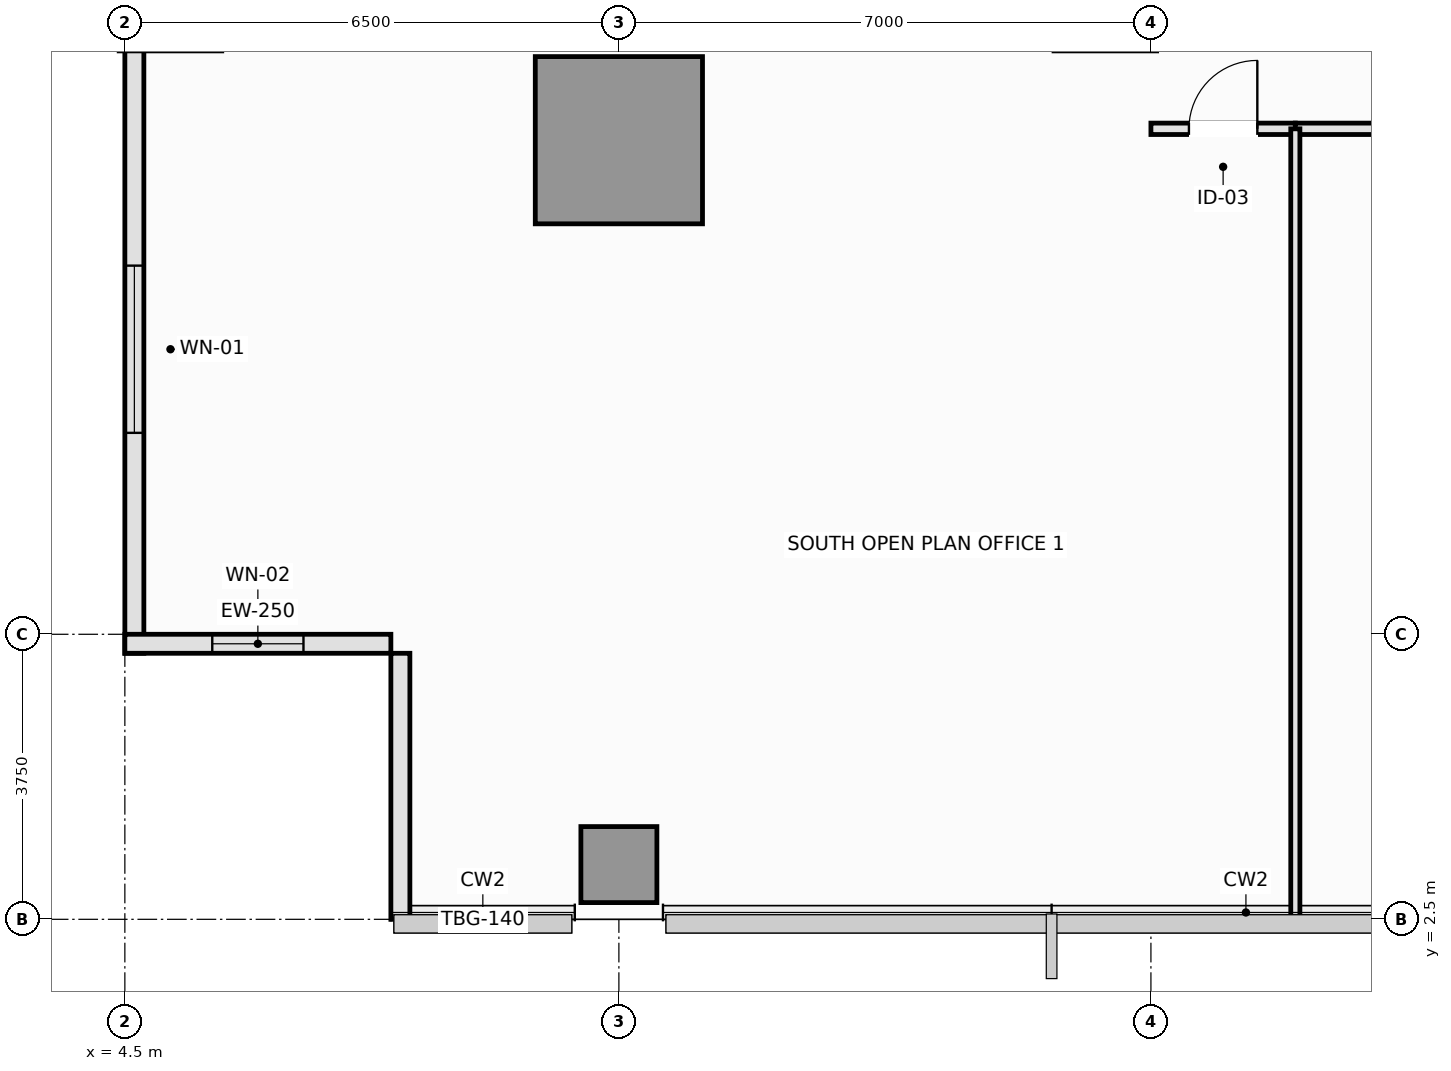
"""IFC4 building model, lengths in metres.
Left out: names, types, materials, properties, quantities, classifications, styles, units other than length and angle.
Written with IfcOpenShell. Run it as: python <this file> out.ifc"""

import sys

from ifc_helpers import new_model, si_unit, direction, frame, frame_2d, origin, origin_2d, place, context, subcontext, project, spatial, rectangle, extrude, element, fill, save


model = new_model("IFC4")
c1 = context("Model", 3, precision=1e-05, world=origin(), true_north=direction((0.0, 1.0)))
c2 = subcontext(c1, "Body", "Model", "MODEL_VIEW")
j1 = project(units=[si_unit("LENGTHUNIT", "METRE"), si_unit("PLANEANGLEUNIT", "RADIAN")], contexts=[c1])
p1 = place(None, origin())
s1 = spatial("IfcSite", under=j1, at=p1, CompositionType="ELEMENT")
p2 = place(p1, origin())
s2 = spatial("IfcBuilding", under=s1, at=p2, CompositionType="ELEMENT")
p3 = place(p2, frame((0.0, 0.0, 78.85)))
s3 = spatial("IfcBuildingStorey", under=s2, at=p3, CompositionType="ELEMENT", Elevation=78.85)
p4 = place(p3, frame((11.0, 12.75, 0.0), z_axis=(0.0, 0.0, 1.0), x_axis=(1.0, 0.0, 0.0)))
e1 = element("IfcColumn", 1, at=p4, inside=s3, PredefinedType="COLUMN", context=c2, shape_type="SweptSolid", body=[
    extrude(rectangle(XDim=2.2, YDim=2.2, at=origin_2d()), origin(), (0.0, 0.0, 1.0), 3.55),
])
p5 = place(p3, frame((11.0, 3.22, 0.0), z_axis=(0.0, 0.0, 1.0), x_axis=(1.0, 0.0, 0.0)))
e2 = element("IfcColumn", 2, at=p5, inside=s3, PredefinedType="COLUMN", context=c2, shape_type="SweptSolid", body=[
    extrude(rectangle(XDim=1.0, YDim=1.0, at=origin_2d()), origin(), (0.0, 0.0, 1.0), 3.55),
])
p6 = place(p3, frame((4.625, 14.0, 0.0), z_axis=(0.0, 0.0, 1.0), x_axis=(0.0, -1.0, 0.0)))
e3 = element("IfcWall", 3, at=p6, inside=s3, PredefinedType="SOLIDWALL", context=c2, shape_type="SweptSolid", body=[
    extrude(rectangle(XDim=8.0, YDim=0.25, at=frame_2d((4.0, 0.0))), origin(), (0.0, 0.0, 1.0), 3.37),
])
p7 = place(p6, frame((2.9, 0.0, 0.9)))
e4 = element("IfcOpeningElement", 4, at=p7, cuts=e3, PredefinedType="OPENING", context=c2, shape_type="SweptSolid", body=[
    extrude(rectangle(XDim=2.2, YDim=1.8, at=frame_2d((1.1, 0.9))), frame((0.0, 0.135, 0.0), z_axis=(0.0, -1.0, 0.0), x_axis=(1.0, 0.0, 0.0)), (0.0, 0.0, 1.0), 0.27),
])
p8 = place(p3, frame((4.5, 6.125, 0.0), z_axis=(0.0, 0.0, 1.0), x_axis=(1.0, 0.0, 0.0)))
e5 = element("IfcWall", 5, at=p8, inside=s3, PredefinedType="SOLIDWALL", context=c2, shape_type="SweptSolid", body=[
    extrude(rectangle(XDim=3.5, YDim=0.25, at=frame_2d((1.75, 0.0))), origin(), (0.0, 0.0, 1.0), 3.37),
])
p9 = place(p8, frame((1.15, 0.0, 0.9)))
e6 = element("IfcOpeningElement", 6, at=p9, cuts=e5, PredefinedType="OPENING", context=c2, shape_type="SweptSolid", body=[
    extrude(rectangle(XDim=1.2, YDim=1.8, at=frame_2d((0.6, 0.9))), frame((0.0, 0.135, 0.0), z_axis=(0.0, -1.0, 0.0), x_axis=(1.0, 0.0, 0.0)), (0.0, 0.0, 1.0), 0.27),
])
p10 = place(p3, frame((8.125, 6.0, 0.0), z_axis=(0.0, 0.0, 1.0), x_axis=(0.0, -1.0, 0.0)))
e7 = element("IfcWall", 7, at=p10, inside=s3, PredefinedType="SOLIDWALL", context=c2, shape_type="SweptSolid", body=[
    extrude(rectangle(XDim=3.5, YDim=0.25, at=frame_2d((1.75, 0.0))), origin(), (0.0, 0.0, 1.0), 3.37),
])
p11 = place(p3, frame((18.0, 12.9, 0.0), z_axis=(0.0, 0.0, 1.0), x_axis=(1.0, 0.0, 0.0)))
e8 = element("IfcWall", 8, at=p11, inside=s3, PredefinedType="PARTITIONING", context=c2, shape_type="SweptSolid", body=[
    extrude(rectangle(XDim=1.9, YDim=0.15, at=frame_2d((0.95, 0.0))), origin(), (0.0, 0.0, 1.0), 2.72),
])
p12 = place(p11, frame((0.5, 0.0, 0.0)))
e9 = element("IfcOpeningElement", 9, at=p12, cuts=e8, PredefinedType="OPENING", context=c2, shape_type="SweptSolid", body=[
    extrude(rectangle(XDim=0.9, YDim=2.1, at=frame_2d((0.45, 1.05))), frame((0.0, 0.085, 0.0), z_axis=(0.0, -1.0, 0.0), x_axis=(1.0, 0.0, 0.0)), (0.0, 0.0, 1.0), 0.17),
])
p13 = place(p3, frame((19.9, 12.9, 0.0), z_axis=(0.0, 0.0, 1.0), x_axis=(1.0, 0.0, 0.0)))
e10 = element("IfcWall", 10, at=p13, inside=s3, PredefinedType="PARTITIONING", context=c2, shape_type="SweptSolid", body=[
    extrude(rectangle(XDim=3.7, YDim=0.15, at=frame_2d((1.85, 0.0))), origin(), (0.0, 0.0, 1.0), 2.72),
])
p14 = place(p13, frame((1.35, 0.0, 0.0)))
e11 = element("IfcOpeningElement", 11, at=p14, cuts=e10, PredefinedType="OPENING", context=c2, shape_type="SweptSolid", body=[
    extrude(rectangle(XDim=1.0, YDim=2.15, at=frame_2d((0.5, 1.075))), frame((0.0, 0.085, 0.0), z_axis=(0.0, -1.0, 0.0), x_axis=(1.0, 0.0, 0.0)), (0.0, 0.0, 1.0), 0.17),
])
p15 = place(p3, frame((19.9, 2.51, 0.0), z_axis=(0.0, 0.0, 1.0), x_axis=(0.0, 1.0, 0.0)))
e12 = element("IfcWall", 12, at=p15, inside=s3, PredefinedType="PARTITIONING", context=c2, shape_type="SweptSolid", body=[
    extrude(rectangle(XDim=10.39, YDim=0.12, at=frame_2d((5.195, 0.0))), origin(), (0.0, 0.0, 1.0), 3.37),
])
p16 = place(p7, origin())
e13 = element("IfcWindow", 13, at=p16, inside=s3, PartitioningType="SINGLE_PANEL", PredefinedType="WINDOW", context=c2, shape_type="SweptSolid", body=[
    extrude(rectangle(XDim=2.2, YDim=1.8, at=frame_2d((1.1, 0.9))), frame((0.0, 0.03, 0.0), z_axis=(0.0, -1.0, 0.0), x_axis=(1.0, 0.0, 0.0)), (0.0, 0.0, 1.0), 0.06),
])
fill(e4, e13)
p17 = place(p9, origin())
e14 = element("IfcWindow", 14, at=p17, inside=s3, PartitioningType="SINGLE_PANEL", PredefinedType="WINDOW", context=c2, shape_type="SweptSolid", body=[
    extrude(rectangle(XDim=1.2, YDim=1.8, at=frame_2d((0.6, 0.9))), frame((0.0, 0.03, 0.0), z_axis=(0.0, -1.0, 0.0), x_axis=(1.0, 0.0, 0.0)), (0.0, 0.0, 1.0), 0.06),
])
fill(e6, e14)
p18 = place(p12, origin())
e15 = element("IfcDoor", 15, at=p18, inside=s3, OperationType="SINGLE_SWING_RIGHT", PredefinedType="DOOR", context=c2, shape_type="SweptSolid", body=[
    extrude(rectangle(XDim=0.9, YDim=2.1, at=frame_2d((0.45, 1.05))), frame((0.0, 0.025, 0.0), z_axis=(0.0, -1.0, 0.0), x_axis=(1.0, 0.0, 0.0)), (0.0, 0.0, 1.0), 0.05),
])
fill(e9, e15)
save(model, sys.argv[1])
